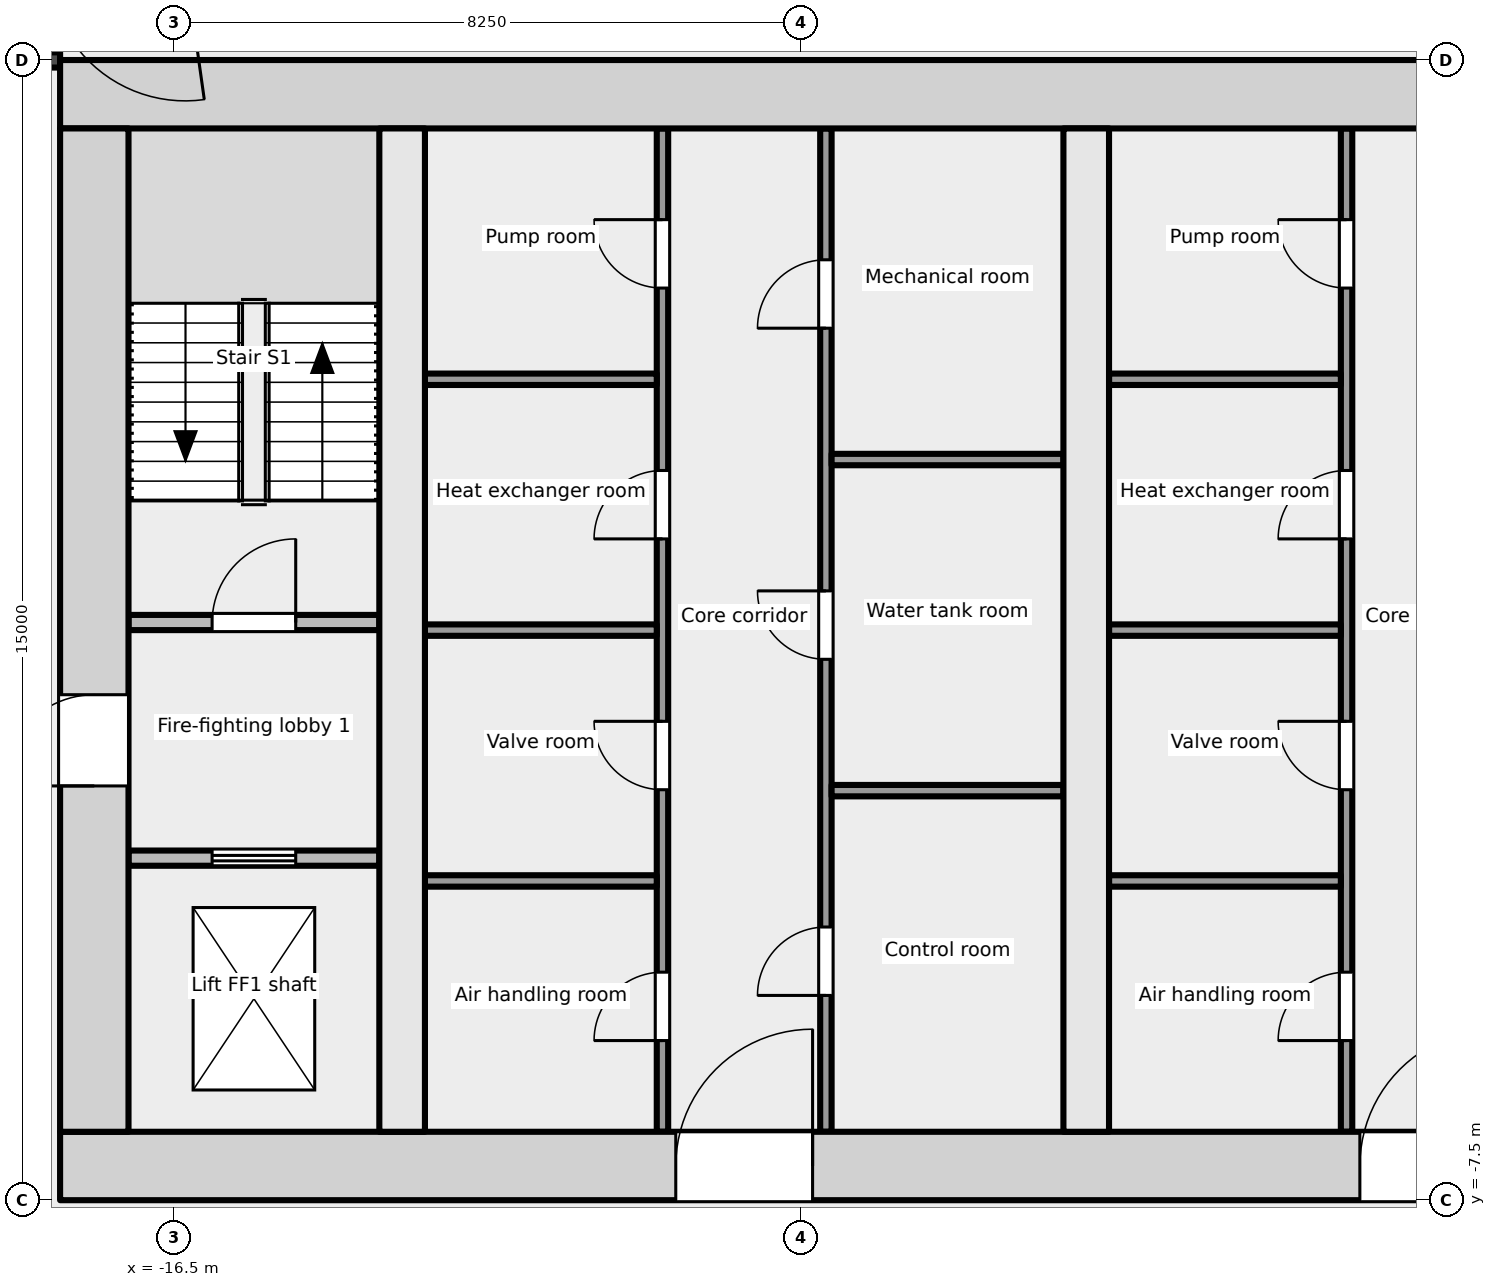
"""IFC4 building model, lengths in metres.
Left out: names, types, materials, properties, quantities, classifications, styles, units other than length and angle.
Written with IfcOpenShell. Run it as: python <this file> out.ifc"""

import sys

from ifc_helpers import new_model, si_unit, direction, frame, frame_2d, origin, place, context, subcontext, project, spatial, rectangle, extrude, element, fill, save


model = new_model("IFC4")
c1 = context("Model", 3, precision=1e-05, world=origin(), true_north=direction((0.0, 1.0)))
c2 = subcontext(c1, "Body", "Model", "MODEL_VIEW")
j1 = project(units=[si_unit("LENGTHUNIT", "METRE"), si_unit("PLANEANGLEUNIT", "RADIAN")], contexts=[c1])
p1 = place(None, origin())
s1 = spatial("IfcSite", under=j1, at=p1, CompositionType="ELEMENT")
p2 = place(p1, origin())
s2 = spatial("IfcBuilding", under=s1, at=p2, CompositionType="ELEMENT")
p3 = place(p2, frame((0.0, 0.0, 292.3)))
s3 = spatial("IfcBuildingStorey", under=s2, at=p3, CompositionType="ELEMENT", Elevation=292.3)
p4 = place(p3, frame((-18.0, -7.05, -0.2), z_axis=(0.0, 0.0, 1.0), x_axis=(1.0, 0.0, 0.0)))
e1 = element("IfcWall", 1, at=p4, inside=s3, PredefinedType="SHEAR", context=c2, shape_type="SweptSolid", body=[
    extrude(rectangle(XDim=36.0, YDim=0.9, at=frame_2d((18.0, 0.0))), origin(), (0.0, 0.0, 1.0), 4.0),
])
p5 = place(p4, frame((8.1, 0.0, 0.2)))
e2 = element("IfcOpeningElement", 2, at=p5, cuts=e1, PredefinedType="OPENING", context=c2, shape_type="SweptSolid", body=[
    extrude(rectangle(XDim=1.8, YDim=2.1, at=frame_2d((0.9, 1.05))), frame((0.0, 0.46, 0.0), z_axis=(0.0, -1.0, 0.0), x_axis=(1.0, 0.0, 0.0)), (0.0, 0.0, 1.0), 0.921),
])
p6 = place(p4, frame((17.1, 0.0, 0.2)))
e3 = element("IfcOpeningElement", 3, at=p6, cuts=e1, PredefinedType="OPENING", context=c2, shape_type="SweptSolid", body=[
    extrude(rectangle(XDim=1.8, YDim=2.1, at=frame_2d((0.9, 1.05))), frame((0.0, 0.46, 0.0), z_axis=(0.0, -1.0, 0.0), x_axis=(1.0, 0.0, 0.0)), (0.0, 0.0, 1.0), 0.921),
])
p7 = place(p4, frame((26.1, 0.0, 0.2)))
e4 = element("IfcOpeningElement", 4, at=p7, cuts=e1, PredefinedType="OPENING", context=c2, shape_type="SweptSolid", body=[
    extrude(rectangle(XDim=1.8, YDim=2.1, at=frame_2d((0.9, 1.05))), frame((0.0, 0.46, 0.0), z_axis=(0.0, -1.0, 0.0), x_axis=(1.0, 0.0, 0.0)), (0.0, 0.0, 1.0), 0.921),
])
p8 = place(p3, frame((-18.0, 7.05, -0.2), z_axis=(0.0, 0.0, 1.0), x_axis=(1.0, 0.0, 0.0)))
e5 = element("IfcWall", 5, at=p8, inside=s3, PredefinedType="SHEAR", context=c2, shape_type="SweptSolid", body=[
    extrude(rectangle(XDim=36.0, YDim=0.9, at=frame_2d((18.0, 0.0))), origin(), (0.0, 0.0, 1.0), 4.0),
])
p9 = place(p3, frame((-17.55, -6.6, -0.2), z_axis=(0.0, 0.0, 1.0), x_axis=(0.0, 1.0, 0.0)))
e6 = element("IfcWall", 6, at=p9, inside=s3, PredefinedType="SHEAR", context=c2, shape_type="SweptSolid", body=[
    extrude(rectangle(XDim=13.2, YDim=0.9, at=frame_2d((6.6, 0.0))), origin(), (0.0, 0.0, 1.0), 4.0),
])
p10 = place(p9, frame((4.55, 0.0, 0.2)))
e7 = element("IfcOpeningElement", 7, at=p10, cuts=e6, PredefinedType="OPENING", context=c2, shape_type="SweptSolid", body=[
    extrude(rectangle(XDim=1.2, YDim=2.1, at=frame_2d((0.6, 1.05))), frame((0.0, 0.46, 0.0), z_axis=(0.0, -1.0, 0.0), x_axis=(1.0, 0.0, 0.0)), (0.0, 0.0, 1.0), 0.921),
])
for number, where, z_axis, x_axis in (
    (8, (-13.5, -6.6, -0.2), (0.0, 0.0, 1.0), (0.0, 1.0, 0.0)),
    (9, (-4.5, -6.6, -0.2), (0.0, 0.0, 1.0), (0.0, 1.0, 0.0)),
):
    element("IfcWall", number, at=place(p3, frame(where, z_axis=z_axis, x_axis=x_axis)), inside=s3, PredefinedType="SHEAR", context=c2, shape_type="SweptSolid", body=[
        extrude(rectangle(XDim=13.2, YDim=0.6, at=frame_2d((6.6, 0.0))), origin(), (0.0, 0.0, 1.0), 4.0),
    ])
p11 = place(p3, frame((-17.1, -3.0, 0.0), z_axis=(0.0, 0.0, 1.0), x_axis=(1.0, 0.0, 0.0)))
e10 = element("IfcWall", 10, at=p11, inside=s3, PredefinedType="PARTITIONING", context=c2, shape_type="SweptSolid", body=[
    extrude(rectangle(XDim=3.3, YDim=0.2, at=frame_2d((1.65, 0.0))), origin(), (0.0, 0.0, 1.0), 3.8),
])
p12 = place(p11, frame((1.1, 0.0, 0.0)))
e11 = element("IfcOpeningElement", 11, at=p12, cuts=e10, PredefinedType="OPENING", context=c2, shape_type="SweptSolid", body=[
    extrude(rectangle(XDim=1.1, YDim=2.1, at=frame_2d((0.55, 1.05))), frame((0.0, 0.111, 0.0), z_axis=(0.0, -1.0, 0.0), x_axis=(1.0, 0.0, 0.0)), (0.0, 0.0, 1.0), 0.221),
])
p13 = place(p3, frame((-17.1, 0.1, 0.0), z_axis=(0.0, 0.0, 1.0), x_axis=(1.0, 0.0, 0.0)))
e12 = element("IfcWall", 12, at=p13, inside=s3, PredefinedType="PARTITIONING", context=c2, shape_type="SweptSolid", body=[
    extrude(rectangle(XDim=3.3, YDim=0.2, at=frame_2d((1.65, 0.0))), origin(), (0.0, 0.0, 1.0), 3.8),
])
p14 = place(p13, frame((1.1, 0.0, 0.0)))
e13 = element("IfcOpeningElement", 13, at=p14, cuts=e12, PredefinedType="OPENING", context=c2, shape_type="SweptSolid", body=[
    extrude(rectangle(XDim=1.1, YDim=2.1, at=frame_2d((0.55, 1.05))), frame((0.0, 0.111, 0.0), z_axis=(0.0, -1.0, 0.0), x_axis=(1.0, 0.0, 0.0)), (0.0, 0.0, 1.0), 0.221),
])
p15 = place(p3, frame((-10.075, -6.6, 0.0), z_axis=(0.0, 0.0, 1.0), x_axis=(0.0, 1.0, 0.0)))
e14 = element("IfcWall", 14, at=p15, inside=s3, PredefinedType="PARTITIONING", context=c2, shape_type="SweptSolid", body=[
    extrude(rectangle(XDim=13.2, YDim=0.15, at=frame_2d((6.6, 0.0))), origin(), (0.0, 0.0, 1.0), 3.8),
])
p16 = place(p15, frame((1.2, 0.0, 0.0)))
e15 = element("IfcOpeningElement", 15, at=p16, cuts=e14, PredefinedType="OPENING", context=c2, shape_type="SweptSolid", body=[
    extrude(rectangle(XDim=0.9, YDim=2.1, at=frame_2d((0.45, 1.05))), frame((0.0, 0.085, 0.0), z_axis=(0.0, -1.0, 0.0), x_axis=(1.0, 0.0, 0.0)), (0.0, 0.0, 1.0), 0.171),
])
p17 = place(p15, frame((4.5, 0.0, 0.0)))
e16 = element("IfcOpeningElement", 16, at=p17, cuts=e14, PredefinedType="OPENING", context=c2, shape_type="SweptSolid", body=[
    extrude(rectangle(XDim=0.9, YDim=2.1, at=frame_2d((0.45, 1.05))), frame((0.0, 0.085, 0.0), z_axis=(0.0, -1.0, 0.0), x_axis=(1.0, 0.0, 0.0)), (0.0, 0.0, 1.0), 0.171),
])
p18 = place(p15, frame((7.8, 0.0, 0.0)))
e17 = element("IfcOpeningElement", 17, at=p18, cuts=e14, PredefinedType="OPENING", context=c2, shape_type="SweptSolid", body=[
    extrude(rectangle(XDim=0.9, YDim=2.1, at=frame_2d((0.45, 1.05))), frame((0.0, 0.085, 0.0), z_axis=(0.0, -1.0, 0.0), x_axis=(1.0, 0.0, 0.0)), (0.0, 0.0, 1.0), 0.171),
])
p19 = place(p15, frame((11.1, 0.0, 0.0)))
e18 = element("IfcOpeningElement", 18, at=p19, cuts=e14, PredefinedType="OPENING", context=c2, shape_type="SweptSolid", body=[
    extrude(rectangle(XDim=0.9, YDim=2.1, at=frame_2d((0.45, 1.05))), frame((0.0, 0.085, 0.0), z_axis=(0.0, -1.0, 0.0), x_axis=(1.0, 0.0, 0.0)), (0.0, 0.0, 1.0), 0.171),
])
for number, where, z_axis, x_axis in (
    (19, (-13.2, -3.3, 0.0), (0.0, 0.0, 1.0), (1.0, 0.0, 0.0)),
    (20, (-13.2, 0.0, 0.0), (0.0, 0.0, 1.0), (1.0, 0.0, 0.0)),
    (21, (-13.2, 3.3, 0.0), (0.0, 0.0, 1.0), (1.0, 0.0, 0.0)),
):
    element("IfcWall", number, at=place(p3, frame(where, z_axis=z_axis, x_axis=x_axis)), inside=s3, PredefinedType="PARTITIONING", context=c2, shape_type="SweptSolid", body=[
        extrude(rectangle(XDim=3.05, YDim=0.15, at=frame_2d((1.525, 0.0))), origin(), (0.0, 0.0, 1.0), 3.8),
    ])
p20 = place(p3, frame((-7.925, -6.6, 0.0), z_axis=(0.0, 0.0, 1.0), x_axis=(0.0, 1.0, 0.0)))
e22 = element("IfcWall", 22, at=p20, inside=s3, PredefinedType="PARTITIONING", context=c2, shape_type="SweptSolid", body=[
    extrude(rectangle(XDim=13.2, YDim=0.15, at=frame_2d((6.6, 0.0))), origin(), (0.0, 0.0, 1.0), 3.8),
])
p21 = place(p20, frame((1.794, 0.0, 0.0)))
e23 = element("IfcOpeningElement", 23, at=p21, cuts=e22, PredefinedType="OPENING", context=c2, shape_type="SweptSolid", body=[
    extrude(rectangle(XDim=0.9, YDim=2.1, at=frame_2d((0.45, 1.05))), frame((0.0, 0.085, 0.0), z_axis=(0.0, -1.0, 0.0), x_axis=(1.0, 0.0, 0.0)), (0.0, 0.0, 1.0), 0.171),
])
p22 = place(p20, frame((6.216, 0.0, 0.0)))
e24 = element("IfcOpeningElement", 24, at=p22, cuts=e22, PredefinedType="OPENING", context=c2, shape_type="SweptSolid", body=[
    extrude(rectangle(XDim=0.9, YDim=2.1, at=frame_2d((0.45, 1.05))), frame((0.0, 0.085, 0.0), z_axis=(0.0, -1.0, 0.0), x_axis=(1.0, 0.0, 0.0)), (0.0, 0.0, 1.0), 0.171),
])
p23 = place(p20, frame((10.572, 0.0, 0.0)))
e25 = element("IfcOpeningElement", 25, at=p23, cuts=e22, PredefinedType="OPENING", context=c2, shape_type="SweptSolid", body=[
    extrude(rectangle(XDim=0.9, YDim=2.1, at=frame_2d((0.45, 1.05))), frame((0.0, 0.085, 0.0), z_axis=(0.0, -1.0, 0.0), x_axis=(1.0, 0.0, 0.0)), (0.0, 0.0, 1.0), 0.171),
])
for number, where, z_axis, x_axis in (
    (26, (-7.85, -2.112, 0.0), (0.0, 0.0, 1.0), (1.0, 0.0, 0.0)),
    (27, (-7.85, 2.244, 0.0), (0.0, 0.0, 1.0), (1.0, 0.0, 0.0)),
):
    element("IfcWall", number, at=place(p3, frame(where, z_axis=z_axis, x_axis=x_axis)), inside=s3, PredefinedType="PARTITIONING", context=c2, shape_type="SweptSolid", body=[
        extrude(rectangle(XDim=3.05, YDim=0.15, at=frame_2d((1.525, 0.0))), origin(), (0.0, 0.0, 1.0), 3.8),
    ])
p24 = place(p3, frame((-1.075, -6.6, 0.0), z_axis=(0.0, 0.0, 1.0), x_axis=(0.0, 1.0, 0.0)))
e28 = element("IfcWall", 28, at=p24, inside=s3, PredefinedType="PARTITIONING", context=c2, shape_type="SweptSolid", body=[
    extrude(rectangle(XDim=13.2, YDim=0.15, at=frame_2d((6.6, 0.0))), origin(), (0.0, 0.0, 1.0), 3.8),
])
p25 = place(p24, frame((1.2, 0.0, 0.0)))
e29 = element("IfcOpeningElement", 29, at=p25, cuts=e28, PredefinedType="OPENING", context=c2, shape_type="SweptSolid", body=[
    extrude(rectangle(XDim=0.9, YDim=2.1, at=frame_2d((0.45, 1.05))), frame((0.0, 0.085, 0.0), z_axis=(0.0, -1.0, 0.0), x_axis=(1.0, 0.0, 0.0)), (0.0, 0.0, 1.0), 0.171),
])
p26 = place(p24, frame((4.5, 0.0, 0.0)))
e30 = element("IfcOpeningElement", 30, at=p26, cuts=e28, PredefinedType="OPENING", context=c2, shape_type="SweptSolid", body=[
    extrude(rectangle(XDim=0.9, YDim=2.1, at=frame_2d((0.45, 1.05))), frame((0.0, 0.085, 0.0), z_axis=(0.0, -1.0, 0.0), x_axis=(1.0, 0.0, 0.0)), (0.0, 0.0, 1.0), 0.171),
])
p27 = place(p24, frame((7.8, 0.0, 0.0)))
e31 = element("IfcOpeningElement", 31, at=p27, cuts=e28, PredefinedType="OPENING", context=c2, shape_type="SweptSolid", body=[
    extrude(rectangle(XDim=0.9, YDim=2.1, at=frame_2d((0.45, 1.05))), frame((0.0, 0.085, 0.0), z_axis=(0.0, -1.0, 0.0), x_axis=(1.0, 0.0, 0.0)), (0.0, 0.0, 1.0), 0.171),
])
p28 = place(p24, frame((11.1, 0.0, 0.0)))
e32 = element("IfcOpeningElement", 32, at=p28, cuts=e28, PredefinedType="OPENING", context=c2, shape_type="SweptSolid", body=[
    extrude(rectangle(XDim=0.9, YDim=2.1, at=frame_2d((0.45, 1.05))), frame((0.0, 0.085, 0.0), z_axis=(0.0, -1.0, 0.0), x_axis=(1.0, 0.0, 0.0)), (0.0, 0.0, 1.0), 0.171),
])
for number, where, z_axis, x_axis in (
    (33, (-4.2, -3.3, 0.0), (0.0, 0.0, 1.0), (1.0, 0.0, 0.0)),
    (34, (-4.2, 0.0, 0.0), (0.0, 0.0, 1.0), (1.0, 0.0, 0.0)),
    (35, (-4.2, 3.3, 0.0), (0.0, 0.0, 1.0), (1.0, 0.0, 0.0)),
):
    element("IfcWall", number, at=place(p3, frame(where, z_axis=z_axis, x_axis=x_axis)), inside=s3, PredefinedType="PARTITIONING", context=c2, shape_type="SweptSolid", body=[
        extrude(rectangle(XDim=3.05, YDim=0.15, at=frame_2d((1.525, 0.0))), origin(), (0.0, 0.0, 1.0), 3.8),
    ])
p29 = place(p3, frame((-20.6, 7.501, 0.0), z_axis=(0.0, 0.0, 1.0), x_axis=(1.0, 0.0, 0.0)))
e36 = element("IfcWall", 36, at=p29, inside=s3, PredefinedType="PARTITIONING", context=c2, shape_type="SweptSolid", body=[
    extrude(rectangle(XDim=2.6, YDim=0.2, at=frame_2d((1.3, 0.0))), origin(), (0.0, 0.0, 1.0), 3.8),
])
p30 = place(p12, origin())
e37 = element("IfcDoor", 37, at=p30, inside=s3, OperationType="DOUBLE_DOOR_SLIDING", PredefinedType="DOOR", context=c2, shape_type="SweptSolid", body=[
    extrude(rectangle(XDim=1.1, YDim=2.1, at=frame_2d((0.55, 1.05))), frame((0.0, 0.025, 0.0), z_axis=(0.0, -1.0, 0.0), x_axis=(1.0, 0.0, 0.0)), (0.0, 0.0, 1.0), 0.05),
])
fill(e11, e37)
p31 = place(p10, origin())
e38 = element("IfcDoor", 38, at=p31, inside=s3, OperationType="SINGLE_SWING_LEFT", PredefinedType="DOOR", context=c2, shape_type="SweptSolid", body=[
    extrude(rectangle(XDim=1.2, YDim=2.1, at=frame_2d((0.6, 1.05))), frame((0.0, 0.025, 0.0), z_axis=(0.0, -1.0, 0.0), x_axis=(1.0, 0.0, 0.0)), (0.0, 0.0, 1.0), 0.05),
])
fill(e7, e38)
p32 = place(p14, origin())
e39 = element("IfcDoor", 39, at=p32, inside=s3, OperationType="SINGLE_SWING_RIGHT", PredefinedType="DOOR", context=c2, shape_type="SweptSolid", body=[
    extrude(rectangle(XDim=1.1, YDim=2.1, at=frame_2d((0.55, 1.05))), frame((0.0, 0.025, 0.0), z_axis=(0.0, -1.0, 0.0), x_axis=(1.0, 0.0, 0.0)), (0.0, 0.0, 1.0), 0.05),
])
fill(e13, e39)
p33 = place(p16, origin())
e40 = element("IfcDoor", 40, at=p33, inside=s3, OperationType="SINGLE_SWING_LEFT", PredefinedType="DOOR", context=c2, shape_type="SweptSolid", body=[
    extrude(rectangle(XDim=0.9, YDim=2.1, at=frame_2d((0.45, 1.05))), frame((0.0, 0.025, 0.0), z_axis=(0.0, -1.0, 0.0), x_axis=(1.0, 0.0, 0.0)), (0.0, 0.0, 1.0), 0.05),
])
fill(e15, e40)
p34 = place(p17, origin())
e41 = element("IfcDoor", 41, at=p34, inside=s3, OperationType="SINGLE_SWING_RIGHT", PredefinedType="DOOR", context=c2, shape_type="SweptSolid", body=[
    extrude(rectangle(XDim=0.9, YDim=2.1, at=frame_2d((0.45, 1.05))), frame((0.0, 0.025, 0.0), z_axis=(0.0, -1.0, 0.0), x_axis=(1.0, 0.0, 0.0)), (0.0, 0.0, 1.0), 0.05),
])
fill(e16, e41)
p35 = place(p18, origin())
e42 = element("IfcDoor", 42, at=p35, inside=s3, OperationType="SINGLE_SWING_LEFT", PredefinedType="DOOR", context=c2, shape_type="SweptSolid", body=[
    extrude(rectangle(XDim=0.9, YDim=2.1, at=frame_2d((0.45, 1.05))), frame((0.0, 0.025, 0.0), z_axis=(0.0, -1.0, 0.0), x_axis=(1.0, 0.0, 0.0)), (0.0, 0.0, 1.0), 0.05),
])
fill(e17, e42)
p36 = place(p19, origin())
e43 = element("IfcDoor", 43, at=p36, inside=s3, OperationType="SINGLE_SWING_RIGHT", PredefinedType="DOOR", context=c2, shape_type="SweptSolid", body=[
    extrude(rectangle(XDim=0.9, YDim=2.1, at=frame_2d((0.45, 1.05))), frame((0.0, 0.025, 0.0), z_axis=(0.0, -1.0, 0.0), x_axis=(1.0, 0.0, 0.0)), (0.0, 0.0, 1.0), 0.05),
])
fill(e18, e43)
p37 = place(p21, origin())
e44 = element("IfcDoor", 44, at=p37, inside=s3, OperationType="SINGLE_SWING_LEFT", PredefinedType="DOOR", context=c2, shape_type="SweptSolid", body=[
    extrude(rectangle(XDim=0.9, YDim=2.1, at=frame_2d((0.45, 1.05))), frame((0.0, 0.025, 0.0), z_axis=(0.0, -1.0, 0.0), x_axis=(1.0, 0.0, 0.0)), (0.0, 0.0, 1.0), 0.05),
])
fill(e23, e44)
p38 = place(p22, origin())
e45 = element("IfcDoor", 45, at=p38, inside=s3, OperationType="SINGLE_SWING_RIGHT", PredefinedType="DOOR", context=c2, shape_type="SweptSolid", body=[
    extrude(rectangle(XDim=0.9, YDim=2.1, at=frame_2d((0.45, 1.05))), frame((0.0, 0.025, 0.0), z_axis=(0.0, -1.0, 0.0), x_axis=(1.0, 0.0, 0.0)), (0.0, 0.0, 1.0), 0.05),
])
fill(e24, e45)
p39 = place(p23, origin())
e46 = element("IfcDoor", 46, at=p39, inside=s3, OperationType="SINGLE_SWING_LEFT", PredefinedType="DOOR", context=c2, shape_type="SweptSolid", body=[
    extrude(rectangle(XDim=0.9, YDim=2.1, at=frame_2d((0.45, 1.05))), frame((0.0, 0.025, 0.0), z_axis=(0.0, -1.0, 0.0), x_axis=(1.0, 0.0, 0.0)), (0.0, 0.0, 1.0), 0.05),
])
fill(e25, e46)
p40 = place(p5, origin())
e47 = element("IfcDoor", 47, at=p40, inside=s3, OperationType="SINGLE_SWING_RIGHT", PredefinedType="DOOR", context=c2, shape_type="SweptSolid", body=[
    extrude(rectangle(XDim=1.8, YDim=2.1, at=frame_2d((0.9, 1.05))), frame((0.0, 0.025, 0.0), z_axis=(0.0, -1.0, 0.0), x_axis=(1.0, 0.0, 0.0)), (0.0, 0.0, 1.0), 0.05),
])
fill(e2, e47)
p41 = place(p25, origin())
e48 = element("IfcDoor", 48, at=p41, inside=s3, OperationType="SINGLE_SWING_LEFT", PredefinedType="DOOR", context=c2, shape_type="SweptSolid", body=[
    extrude(rectangle(XDim=0.9, YDim=2.1, at=frame_2d((0.45, 1.05))), frame((0.0, 0.025, 0.0), z_axis=(0.0, -1.0, 0.0), x_axis=(1.0, 0.0, 0.0)), (0.0, 0.0, 1.0), 0.05),
])
fill(e29, e48)
p42 = place(p26, origin())
e49 = element("IfcDoor", 49, at=p42, inside=s3, OperationType="SINGLE_SWING_RIGHT", PredefinedType="DOOR", context=c2, shape_type="SweptSolid", body=[
    extrude(rectangle(XDim=0.9, YDim=2.1, at=frame_2d((0.45, 1.05))), frame((0.0, 0.025, 0.0), z_axis=(0.0, -1.0, 0.0), x_axis=(1.0, 0.0, 0.0)), (0.0, 0.0, 1.0), 0.05),
])
fill(e30, e49)
p43 = place(p27, origin())
e50 = element("IfcDoor", 50, at=p43, inside=s3, OperationType="SINGLE_SWING_LEFT", PredefinedType="DOOR", context=c2, shape_type="SweptSolid", body=[
    extrude(rectangle(XDim=0.9, YDim=2.1, at=frame_2d((0.45, 1.05))), frame((0.0, 0.025, 0.0), z_axis=(0.0, -1.0, 0.0), x_axis=(1.0, 0.0, 0.0)), (0.0, 0.0, 1.0), 0.05),
])
fill(e31, e50)
p44 = place(p28, origin())
e51 = element("IfcDoor", 51, at=p44, inside=s3, OperationType="SINGLE_SWING_RIGHT", PredefinedType="DOOR", context=c2, shape_type="SweptSolid", body=[
    extrude(rectangle(XDim=0.9, YDim=2.1, at=frame_2d((0.45, 1.05))), frame((0.0, 0.025, 0.0), z_axis=(0.0, -1.0, 0.0), x_axis=(1.0, 0.0, 0.0)), (0.0, 0.0, 1.0), 0.05),
])
fill(e32, e51)
p45 = place(p6, origin())
e52 = element("IfcDoor", 52, at=p45, inside=s3, OperationType="SINGLE_SWING_RIGHT", PredefinedType="DOOR", context=c2, shape_type="SweptSolid", body=[
    extrude(rectangle(XDim=1.8, YDim=2.1, at=frame_2d((0.9, 1.05))), frame((0.0, 0.025, 0.0), z_axis=(0.0, -1.0, 0.0), x_axis=(1.0, 0.0, 0.0)), (0.0, 0.0, 1.0), 0.05),
])
fill(e3, e52)
save(model, sys.argv[1])
